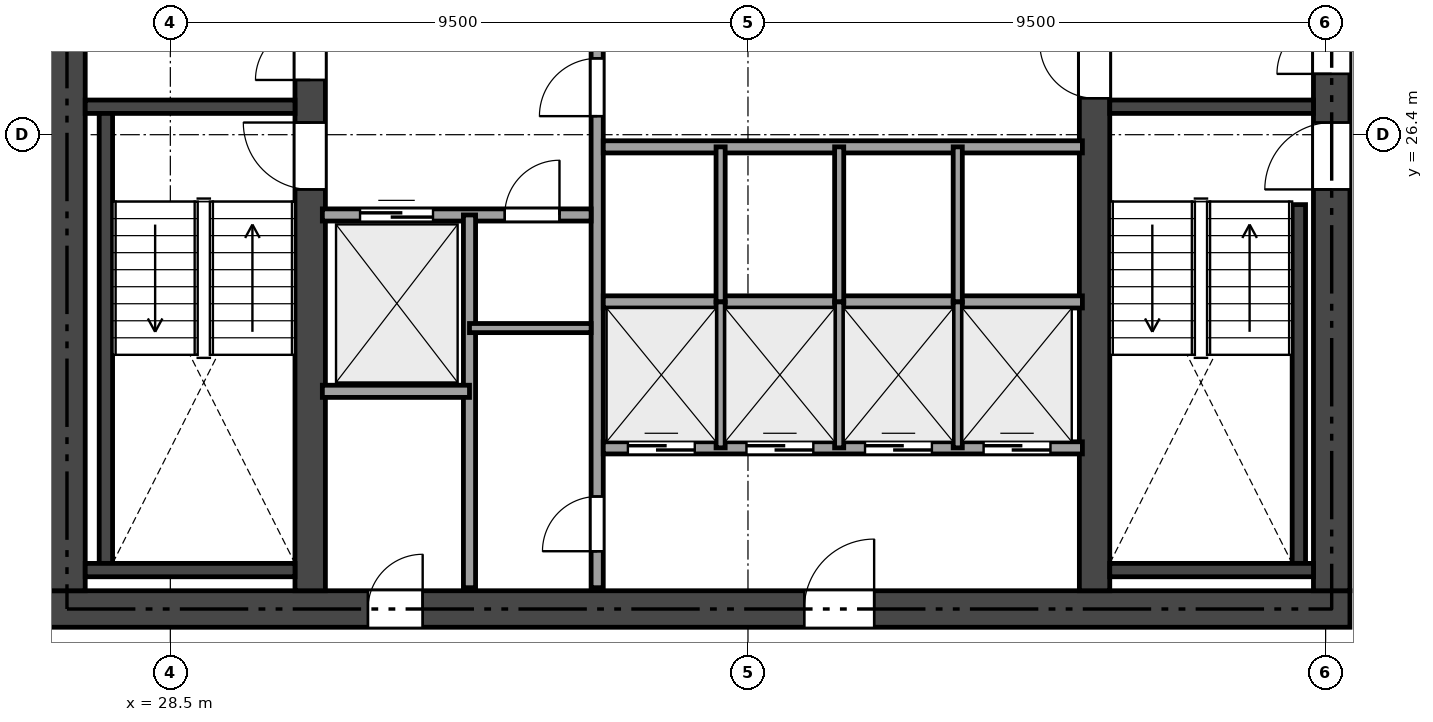
"""IFC4 building model, lengths in metres.
Left out: names, types, materials, properties, quantities, classifications, styles, units other than length and angle.
Written with IfcOpenShell. Run it as: python <this file> out.ifc"""

import sys

from ifc_helpers import new_model, si_unit, direction, frame, frame_2d, origin, place, context, subcontext, project, spatial, rectangle, extrude, element, fill, save


model = new_model("IFC4")
c1 = context("Model", 3, precision=1e-05, world=origin(), true_north=direction((0.0, 1.0)))
c2 = subcontext(c1, "Body", "Model", "MODEL_VIEW")
j1 = project(units=[si_unit("LENGTHUNIT", "METRE"), si_unit("PLANEANGLEUNIT", "RADIAN")], contexts=[c1])
p1 = place(None, origin())
s1 = spatial("IfcSite", under=j1, at=p1, CompositionType="ELEMENT")
p2 = place(p1, origin())
s2 = spatial("IfcBuilding", under=s1, at=p2, CompositionType="ELEMENT")
p3 = place(p2, frame((0.0, 0.0, 79.8)))
s3 = spatial("IfcBuildingStorey", under=s2, at=p3, CompositionType="ELEMENT", Elevation=79.8)
p4 = place(p3, frame((26.5, 18.6, 0.0), z_axis=(0.0, 0.0, 1.0), x_axis=(1.0, 0.0, 0.0)))
e1 = element("IfcWall", 1, at=p4, inside=s3, PredefinedType="SHEAR", context=c2, shape_type="SweptSolid", body=[
    extrude(rectangle(XDim=21.4, YDim=0.6, at=frame_2d((10.7, 0.0))), origin(), (0.0, 0.0, 1.0), 3.17),
])
p5 = place(p4, frame((12.425, 0.0, 0.0)))
e2 = element("IfcOpeningElement", 2, at=p5, cuts=e1, PredefinedType="OPENING", context=c2, shape_type="SweptSolid", body=[
    extrude(rectangle(XDim=1.15, YDim=2.15, at=frame_2d((0.575, 1.075))), frame((0.0, 0.31, 0.0), z_axis=(0.0, -1.0, 0.0), x_axis=(1.0, 0.0, 0.0)), (0.0, 0.0, 1.0), 0.62),
])
p6 = place(p4, frame((5.25, 0.0, 0.0)))
e3 = element("IfcOpeningElement", 3, at=p6, cuts=e1, PredefinedType="OPENING", context=c2, shape_type="SweptSolid", body=[
    extrude(rectangle(XDim=0.9, YDim=2.1, at=frame_2d((0.45, 1.05))), frame((0.0, 0.31, 0.0), z_axis=(0.0, -1.0, 0.0), x_axis=(1.0, 0.0, 0.0)), (0.0, 0.0, 1.0), 0.62),
])
p7 = place(p3, frame((26.8, 18.9, 0.0), z_axis=(0.0, 0.0, 1.0), x_axis=(0.0, 1.0, 0.0)))
e4 = element("IfcWall", 4, at=p7, inside=s3, PredefinedType="SHEAR", context=c2, shape_type="SweptSolid", body=[
    extrude(rectangle(XDim=15.0, YDim=0.6, at=frame_2d((7.5, 0.0))), origin(), (0.0, 0.0, 1.0), 3.17),
])
p8 = place(p3, frame((47.6, 18.9, 0.0), z_axis=(0.0, 0.0, 1.0), x_axis=(0.0, 1.0, 0.0)))
e5 = element("IfcWall", 5, at=p8, inside=s3, PredefinedType="SHEAR", context=c2, shape_type="SweptSolid", body=[
    extrude(rectangle(XDim=15.0, YDim=0.6, at=frame_2d((7.5, 0.0))), origin(), (0.0, 0.0, 1.0), 3.17),
])
p9 = place(p8, frame((6.6, 0.0, 0.0)))
e6 = element("IfcOpeningElement", 6, at=p9, cuts=e5, PredefinedType="OPENING", context=c2, shape_type="SweptSolid", body=[
    extrude(rectangle(XDim=1.1, YDim=2.15, at=frame_2d((0.55, 1.075))), frame((0.0, 0.31, 0.0), z_axis=(0.0, -1.0, 0.0), x_axis=(1.0, 0.0, 0.0)), (0.0, 0.0, 1.0), 0.62),
])
p10 = place(p8, frame((8.5, 0.0, 0.0)))
e7 = element("IfcOpeningElement", 7, at=p10, cuts=e5, PredefinedType="OPENING", context=c2, shape_type="SweptSolid", body=[
    extrude(rectangle(XDim=0.9, YDim=2.1, at=frame_2d((0.45, 1.05))), frame((0.0, 0.31, 0.0), z_axis=(0.0, -1.0, 0.0), x_axis=(1.0, 0.0, 0.0)), (0.0, 0.0, 1.0), 0.62),
])
p11 = place(p8, frame((13.15, 0.0, 0.0)))
e8 = element("IfcOpeningElement", 8, at=p11, cuts=e5, PredefinedType="OPENING", context=c2, shape_type="SweptSolid", body=[
    extrude(rectangle(XDim=0.9, YDim=2.1, at=frame_2d((0.45, 1.05))), frame((0.0, 0.31, 0.0), z_axis=(0.0, -1.0, 0.0), x_axis=(1.0, 0.0, 0.0)), (0.0, 0.0, 1.0), 0.62),
])
p12 = place(p3, frame((30.8, 18.9, 0.0), z_axis=(0.0, 0.0, 1.0), x_axis=(0.0, 1.0, 0.0)))
e9 = element("IfcWall", 9, at=p12, inside=s3, PredefinedType="SHEAR", context=c2, shape_type="SweptSolid", body=[
    extrude(rectangle(XDim=15.0, YDim=0.5, at=frame_2d((7.5, 0.0))), origin(), (0.0, 0.0, 1.0), 3.17),
])
p13 = place(p12, frame((6.6, 0.0, 0.0)))
e10 = element("IfcOpeningElement", 10, at=p13, cuts=e9, PredefinedType="OPENING", context=c2, shape_type="SweptSolid", body=[
    extrude(rectangle(XDim=1.1, YDim=2.15, at=frame_2d((0.55, 1.075))), frame((0.0, 0.26, 0.0), z_axis=(0.0, -1.0, 0.0), x_axis=(1.0, 0.0, 0.0)), (0.0, 0.0, 1.0), 0.52),
])
p14 = place(p12, frame((8.4, 0.0, 0.0)))
e11 = element("IfcOpeningElement", 11, at=p14, cuts=e9, PredefinedType="OPENING", context=c2, shape_type="SweptSolid", body=[
    extrude(rectangle(XDim=0.9, YDim=2.1, at=frame_2d((0.45, 1.05))), frame((0.0, 0.26, 0.0), z_axis=(0.0, -1.0, 0.0), x_axis=(1.0, 0.0, 0.0)), (0.0, 0.0, 1.0), 0.52),
])
p15 = place(p3, frame((43.7, 18.9, 0.0), z_axis=(0.0, 0.0, 1.0), x_axis=(0.0, 1.0, 0.0)))
e12 = element("IfcWall", 12, at=p15, inside=s3, PredefinedType="SHEAR", context=c2, shape_type="SweptSolid", body=[
    extrude(rectangle(XDim=15.0, YDim=0.5, at=frame_2d((7.5, 0.0))), origin(), (0.0, 0.0, 1.0), 3.17),
])
p16 = place(p15, frame((8.1, 0.0, 0.0)))
e13 = element("IfcOpeningElement", 13, at=p16, cuts=e12, PredefinedType="OPENING", context=c2, shape_type="SweptSolid", body=[
    extrude(rectangle(XDim=0.9, YDim=2.1, at=frame_2d((0.45, 1.05))), frame((0.0, 0.26, 0.0), z_axis=(0.0, -1.0, 0.0), x_axis=(1.0, 0.0, 0.0)), (0.0, 0.0, 1.0), 0.52),
])
p17 = place(p3, frame((27.1, 26.86, 0.0), z_axis=(0.0, 0.0, 1.0), x_axis=(1.0, 0.0, 0.0)))
e14 = element("IfcWall", 14, at=p17, inside=s3, PredefinedType="SHEAR", context=c2, shape_type="SweptSolid", body=[
    extrude(rectangle(XDim=3.45, YDim=0.22, at=frame_2d((1.725, 0.0))), origin(), (0.0, 0.0, 1.0), 3.17),
])
p18 = place(p3, frame((27.44, 19.35, 0.0), z_axis=(0.0, 0.0, 1.0), x_axis=(0.0, 1.0, 0.0)))
e15 = element("IfcWall", 15, at=p18, inside=s3, PredefinedType="SHEAR", context=c2, shape_type="SweptSolid", body=[
    extrude(rectangle(XDim=7.4, YDim=0.22, at=frame_2d((3.7, 0.0))), origin(), (0.0, 0.0, 1.0), 3.17),
])
p19 = place(p3, frame((27.1, 19.24, 0.0), z_axis=(0.0, 0.0, 1.0), x_axis=(1.0, 0.0, 0.0)))
e16 = element("IfcWall", 16, at=p19, inside=s3, PredefinedType="SHEAR", context=c2, shape_type="SweptSolid", body=[
    extrude(rectangle(XDim=3.45, YDim=0.22, at=frame_2d((1.725, 0.0))), origin(), (0.0, 0.0, 1.0), 3.17),
])
p20 = place(p3, frame((43.95, 26.86, 0.0), z_axis=(0.0, 0.0, 1.0), x_axis=(1.0, 0.0, 0.0)))
e17 = element("IfcWall", 17, at=p20, inside=s3, PredefinedType="SHEAR", context=c2, shape_type="SweptSolid", body=[
    extrude(rectangle(XDim=3.35, YDim=0.22, at=frame_2d((1.675, 0.0))), origin(), (0.0, 0.0, 1.0), 3.17),
])
p21 = place(p3, frame((47.06, 19.35, 0.0), z_axis=(0.0, 0.0, 1.0), x_axis=(0.0, 1.0, 0.0)))
e18 = element("IfcWall", 18, at=p21, inside=s3, PredefinedType="SHEAR", context=c2, shape_type="SweptSolid", body=[
    extrude(rectangle(XDim=5.9, YDim=0.22, at=frame_2d((2.95, 0.0))), origin(), (0.0, 0.0, 1.0), 3.17),
])
p22 = place(p3, frame((43.95, 19.24, 0.0), z_axis=(0.0, 0.0, 1.0), x_axis=(1.0, 0.0, 0.0)))
e19 = element("IfcWall", 19, at=p22, inside=s3, PredefinedType="SHEAR", context=c2, shape_type="SweptSolid", body=[
    extrude(rectangle(XDim=3.35, YDim=0.22, at=frame_2d((1.675, 0.0))), origin(), (0.0, 0.0, 1.0), 3.17),
])
p23 = place(p3, frame((35.52, 18.95, 0.0), z_axis=(0.0, 0.0, 1.0), x_axis=(0.0, 1.0, 0.0)))
e20 = element("IfcWall", 20, at=p23, inside=s3, PredefinedType="SOLIDWALL", context=c2, shape_type="SweptSolid", body=[
    extrude(rectangle(XDim=14.9, YDim=0.2, at=frame_2d((7.45, 0.0))), origin(), (0.0, 0.0, 1.0), 2.691),
])
p24 = place(p23, frame((7.755, 0.0, 0.0)))
e21 = element("IfcOpeningElement", 21, at=p24, cuts=e20, PredefinedType="OPENING", context=c2, shape_type="SweptSolid", body=[
    extrude(rectangle(XDim=0.95, YDim=2.15, at=frame_2d((0.475, 1.075))), frame((0.0, 0.11, 0.0), z_axis=(0.0, -1.0, 0.0), x_axis=(1.0, 0.0, 0.0)), (0.0, 0.0, 1.0), 0.22),
])
p25 = place(p23, frame((0.6, 0.0, 0.0)))
e22 = element("IfcOpeningElement", 22, at=p25, cuts=e20, PredefinedType="OPENING", context=c2, shape_type="SweptSolid", body=[
    extrude(rectangle(XDim=0.9, YDim=2.1, at=frame_2d((0.45, 1.05))), frame((0.0, 0.11, 0.0), z_axis=(0.0, -1.0, 0.0), x_axis=(1.0, 0.0, 0.0)), (0.0, 0.0, 1.0), 0.22),
])
p26 = place(p3, frame((31.0, 25.08, 0.0), z_axis=(0.0, 0.0, 1.0), x_axis=(1.0, 0.0, 0.0)))
e23 = element("IfcWall", 23, at=p26, inside=s3, PredefinedType="SOLIDWALL", context=c2, shape_type="SweptSolid", body=[
    extrude(rectangle(XDim=4.42, YDim=0.2, at=frame_2d((2.21, 0.0))), origin(), (0.0, 0.0, 1.0), 3.17),
])
p27 = place(p26, frame((3.0, 0.0, 0.0)))
e24 = element("IfcOpeningElement", 24, at=p27, cuts=e23, PredefinedType="OPENING", context=c2, shape_type="SweptSolid", body=[
    extrude(rectangle(XDim=0.9, YDim=2.1, at=frame_2d((0.45, 1.05))), frame((0.0, 0.11, 0.0), z_axis=(0.0, -1.0, 0.0), x_axis=(1.0, 0.0, 0.0)), (0.0, 0.0, 1.0), 0.22),
])
p28 = place(p26, frame((0.62, 0.0, 0.0)))
e25 = element("IfcOpeningElement", 25, at=p28, cuts=e23, PredefinedType="OPENING", context=c2, shape_type="SweptSolid", body=[
    extrude(rectangle(XDim=1.2, YDim=2.15, at=frame_2d((0.6, 1.075))), frame((0.0, 0.11, 0.0), z_axis=(0.0, -1.0, 0.0), x_axis=(1.0, 0.0, 0.0)), (0.0, 0.0, 1.0), 0.22),
])
p29 = place(p3, frame((33.42, 18.95, 0.0), z_axis=(0.0, 0.0, 1.0), x_axis=(0.0, 1.0, 0.0)))
e26 = element("IfcWall", 26, at=p29, inside=s3, PredefinedType="SOLIDWALL", context=c2, shape_type="SweptSolid", body=[
    extrude(rectangle(XDim=6.13, YDim=0.2, at=frame_2d((3.065, 0.0))), origin(), (0.0, 0.0, 1.0), 2.691),
])
p30 = place(p3, frame((31.0, 22.18, 0.0), z_axis=(0.0, 0.0, 1.0), x_axis=(1.0, 0.0, 0.0)))
e27 = element("IfcWall", 27, at=p30, inside=s3, PredefinedType="SOLIDWALL", context=c2, shape_type="SweptSolid", body=[
    extrude(rectangle(XDim=2.42, YDim=0.2, at=frame_2d((1.21, 0.0))), origin(), (0.0, 0.0, 1.0), 3.17),
])
p31 = place(p3, frame((33.42, 23.22, 0.0), z_axis=(0.0, 0.0, 1.0), x_axis=(1.0, 0.0, 0.0)))
e28 = element("IfcWall", 28, at=p31, inside=s3, PredefinedType="PARTITIONING", context=c2, shape_type="SweptSolid", body=[
    extrude(rectangle(XDim=2.0, YDim=0.15, at=frame_2d((1.0, 0.0))), origin(), (0.0, 0.0, 1.0), 3.17),
])
p32 = place(p3, frame((35.62, 26.2, 0.0), z_axis=(0.0, 0.0, 1.0), x_axis=(1.0, 0.0, 0.0)))
e29 = element("IfcWall", 29, at=p32, inside=s3, PredefinedType="SOLIDWALL", context=c2, shape_type="SweptSolid", body=[
    extrude(rectangle(XDim=7.88, YDim=0.2, at=frame_2d((3.94, 0.0))), origin(), (0.0, 0.0, 1.0), 3.17),
])
p33 = place(p3, frame((35.62, 23.65, 0.0), z_axis=(0.0, 0.0, 1.0), x_axis=(1.0, 0.0, 0.0)))
e30 = element("IfcWall", 30, at=p33, inside=s3, PredefinedType="SOLIDWALL", context=c2, shape_type="SweptSolid", body=[
    extrude(rectangle(XDim=7.88, YDim=0.2, at=frame_2d((3.94, 0.0))), origin(), (0.0, 0.0, 1.0), 2.691),
])
p34 = place(p3, frame((35.62, 21.25, 0.0), z_axis=(0.0, 0.0, 1.0), x_axis=(1.0, 0.0, 0.0)))
e31 = element("IfcWall", 31, at=p34, inside=s3, PredefinedType="SOLIDWALL", context=c2, shape_type="SweptSolid", body=[
    extrude(rectangle(XDim=7.88, YDim=0.2, at=frame_2d((3.94, 0.0))), origin(), (0.0, 0.0, 1.0), 3.17),
])
p35 = place(p34, frame((0.405, 0.0, 0.0)))
e32 = element("IfcOpeningElement", 32, at=p35, cuts=e31, PredefinedType="OPENING", context=c2, shape_type="SweptSolid", body=[
    extrude(rectangle(XDim=1.1, YDim=2.15, at=frame_2d((0.55, 1.075))), frame((0.0, 0.11, 0.0), z_axis=(0.0, -1.0, 0.0), x_axis=(1.0, 0.0, 0.0)), (0.0, 0.0, 1.0), 0.22),
])
p36 = place(p34, frame((2.355, 0.0, 0.0)))
e33 = element("IfcOpeningElement", 33, at=p36, cuts=e31, PredefinedType="OPENING", context=c2, shape_type="SweptSolid", body=[
    extrude(rectangle(XDim=1.1, YDim=2.15, at=frame_2d((0.55, 1.075))), frame((0.0, 0.11, 0.0), z_axis=(0.0, -1.0, 0.0), x_axis=(1.0, 0.0, 0.0)), (0.0, 0.0, 1.0), 0.22),
])
p37 = place(p34, frame((4.305, 0.0, 0.0)))
e34 = element("IfcOpeningElement", 34, at=p37, cuts=e31, PredefinedType="OPENING", context=c2, shape_type="SweptSolid", body=[
    extrude(rectangle(XDim=1.1, YDim=2.15, at=frame_2d((0.55, 1.075))), frame((0.0, 0.11, 0.0), z_axis=(0.0, -1.0, 0.0), x_axis=(1.0, 0.0, 0.0)), (0.0, 0.0, 1.0), 0.22),
])
p38 = place(p34, frame((6.255, 0.0, 0.0)))
e35 = element("IfcOpeningElement", 35, at=p38, cuts=e31, PredefinedType="OPENING", context=c2, shape_type="SweptSolid", body=[
    extrude(rectangle(XDim=1.1, YDim=2.15, at=frame_2d((0.55, 1.075))), frame((0.0, 0.11, 0.0), z_axis=(0.0, -1.0, 0.0), x_axis=(1.0, 0.0, 0.0)), (0.0, 0.0, 1.0), 0.22),
])
for number, where, z_axis, x_axis in (
    (36, (37.55, 23.65, 0.0), (0.0, 0.0, 1.0), (0.0, 1.0, 0.0)),
    (37, (39.5, 23.65, 0.0), (0.0, 0.0, 1.0), (0.0, 1.0, 0.0)),
    (38, (41.45, 23.65, 0.0), (0.0, 0.0, 1.0), (0.0, 1.0, 0.0)),
):
    element("IfcWall", number, at=place(p3, frame(where, z_axis=z_axis, x_axis=x_axis)), inside=s3, PredefinedType="PARTITIONING", context=c2, shape_type="SweptSolid", body=[
        extrude(rectangle(XDim=2.55, YDim=0.15, at=frame_2d((1.275, 0.0))), origin(), (0.0, 0.0, 1.0), 2.691),
    ])
for number, where, z_axis, x_axis in (
    (39, (37.55, 21.25, 0.0), (0.0, 0.0, 1.0), (0.0, 1.0, 0.0)),
    (40, (39.5, 21.25, 0.0), (0.0, 0.0, 1.0), (0.0, 1.0, 0.0)),
    (41, (41.45, 21.25, 0.0), (0.0, 0.0, 1.0), (0.0, 1.0, 0.0)),
):
    element("IfcWall", number, at=place(p3, frame(where, z_axis=z_axis, x_axis=x_axis)), inside=s3, PredefinedType="PARTITIONING", context=c2, shape_type="SweptSolid", body=[
        extrude(rectangle(XDim=2.4, YDim=0.15, at=frame_2d((1.2, 0.0))), origin(), (0.0, 0.0, 1.0), 2.691),
    ])
p39 = place(p13, origin())
e42 = element("IfcDoor", 42, at=p39, inside=s3, OperationType="SINGLE_SWING_RIGHT", PredefinedType="DOOR", context=c2, shape_type="SweptSolid", body=[
    extrude(rectangle(XDim=1.1, YDim=2.15, at=frame_2d((0.55, 1.075))), frame((0.0, 0.025, 0.0), z_axis=(0.0, -1.0, 0.0), x_axis=(1.0, 0.0, 0.0)), (0.0, 0.0, 1.0), 0.05),
])
fill(e10, e42)
p40 = place(p9, origin())
e43 = element("IfcDoor", 43, at=p40, inside=s3, OperationType="SINGLE_SWING_LEFT", PredefinedType="DOOR", context=c2, shape_type="SweptSolid", body=[
    extrude(rectangle(XDim=1.1, YDim=2.15, at=frame_2d((0.55, 1.075))), frame((0.0, 0.025, 0.0), z_axis=(0.0, -1.0, 0.0), x_axis=(1.0, 0.0, 0.0)), (0.0, 0.0, 1.0), 0.05),
])
fill(e6, e43)
p41 = place(p24, origin())
e44 = element("IfcDoor", 44, at=p41, inside=s3, OperationType="SINGLE_SWING_LEFT", PredefinedType="DOOR", context=c2, shape_type="SweptSolid", body=[
    extrude(rectangle(XDim=0.95, YDim=2.15, at=frame_2d((0.475, 1.075))), frame((0.0, 0.025, 0.0), z_axis=(0.0, -1.0, 0.0), x_axis=(1.0, 0.0, 0.0)), (0.0, 0.0, 1.0), 0.05),
])
fill(e21, e44)
p42 = place(p16, origin())
e45 = element("IfcDoor", 45, at=p42, inside=s3, OperationType="SINGLE_SWING_RIGHT", PredefinedType="DOOR", context=c2, shape_type="SweptSolid", body=[
    extrude(rectangle(XDim=0.9, YDim=2.1, at=frame_2d((0.45, 1.05))), frame((0.0, 0.025, 0.0), z_axis=(0.0, -1.0, 0.0), x_axis=(1.0, 0.0, 0.0)), (0.0, 0.0, 1.0), 0.05),
])
fill(e13, e45)
p43 = place(p10, origin())
e46 = element("IfcDoor", 46, at=p43, inside=s3, OperationType="SINGLE_SWING_LEFT", PredefinedType="DOOR", context=c2, shape_type="SweptSolid", body=[
    extrude(rectangle(XDim=0.9, YDim=2.1, at=frame_2d((0.45, 1.05))), frame((0.0, 0.025, 0.0), z_axis=(0.0, -1.0, 0.0), x_axis=(1.0, 0.0, 0.0)), (0.0, 0.0, 1.0), 0.05),
])
fill(e7, e46)
p44 = place(p5, origin())
e47 = element("IfcDoor", 47, at=p44, inside=s3, OperationType="SINGLE_SWING_RIGHT", PredefinedType="DOOR", context=c2, shape_type="SweptSolid", body=[
    extrude(rectangle(XDim=1.15, YDim=2.15, at=frame_2d((0.575, 1.075))), frame((0.0, 0.025, 0.0), z_axis=(0.0, -1.0, 0.0), x_axis=(1.0, 0.0, 0.0)), (0.0, 0.0, 1.0), 0.05),
])
fill(e2, e47)
p45 = place(p14, origin())
e48 = element("IfcDoor", 48, at=p45, inside=s3, OperationType="SINGLE_SWING_LEFT", PredefinedType="DOOR", context=c2, shape_type="SweptSolid", body=[
    extrude(rectangle(XDim=0.9, YDim=2.1, at=frame_2d((0.45, 1.05))), frame((0.0, 0.025, 0.0), z_axis=(0.0, -1.0, 0.0), x_axis=(1.0, 0.0, 0.0)), (0.0, 0.0, 1.0), 0.05),
])
fill(e11, e48)
p46 = place(p6, origin())
e49 = element("IfcDoor", 49, at=p46, inside=s3, OperationType="SINGLE_SWING_RIGHT", PredefinedType="DOOR", context=c2, shape_type="SweptSolid", body=[
    extrude(rectangle(XDim=0.9, YDim=2.1, at=frame_2d((0.45, 1.05))), frame((0.0, 0.025, 0.0), z_axis=(0.0, -1.0, 0.0), x_axis=(1.0, 0.0, 0.0)), (0.0, 0.0, 1.0), 0.05),
])
fill(e3, e49)
p47 = place(p25, origin())
e50 = element("IfcDoor", 50, at=p47, inside=s3, OperationType="SINGLE_SWING_LEFT", PredefinedType="DOOR", context=c2, shape_type="SweptSolid", body=[
    extrude(rectangle(XDim=0.9, YDim=2.1, at=frame_2d((0.45, 1.05))), frame((0.0, 0.025, 0.0), z_axis=(0.0, -1.0, 0.0), x_axis=(1.0, 0.0, 0.0)), (0.0, 0.0, 1.0), 0.05),
])
fill(e22, e50)
p48 = place(p27, origin())
e51 = element("IfcDoor", 51, at=p48, inside=s3, OperationType="SINGLE_SWING_RIGHT", PredefinedType="DOOR", context=c2, shape_type="SweptSolid", body=[
    extrude(rectangle(XDim=0.9, YDim=2.1, at=frame_2d((0.45, 1.05))), frame((0.0, 0.025, 0.0), z_axis=(0.0, -1.0, 0.0), x_axis=(1.0, 0.0, 0.0)), (0.0, 0.0, 1.0), 0.05),
])
fill(e24, e51)
p49 = place(p28, origin())
e52 = element("IfcDoor", 52, at=p49, inside=s3, OperationType="SLIDING_TO_LEFT", PredefinedType="DOOR", context=c2, shape_type="SweptSolid", body=[
    extrude(rectangle(XDim=1.2, YDim=2.15, at=frame_2d((0.6, 1.075))), frame((0.0, 0.025, 0.0), z_axis=(0.0, -1.0, 0.0), x_axis=(1.0, 0.0, 0.0)), (0.0, 0.0, 1.0), 0.05),
])
fill(e25, e52)
p50 = place(p35, origin())
e53 = element("IfcDoor", 53, at=p50, inside=s3, OperationType="SLIDING_TO_LEFT", PredefinedType="DOOR", context=c2, shape_type="SweptSolid", body=[
    extrude(rectangle(XDim=1.1, YDim=2.15, at=frame_2d((0.55, 1.075))), frame((0.0, 0.025, 0.0), z_axis=(0.0, -1.0, 0.0), x_axis=(1.0, 0.0, 0.0)), (0.0, 0.0, 1.0), 0.05),
])
fill(e32, e53)
p51 = place(p36, origin())
e54 = element("IfcDoor", 54, at=p51, inside=s3, OperationType="SLIDING_TO_LEFT", PredefinedType="DOOR", context=c2, shape_type="SweptSolid", body=[
    extrude(rectangle(XDim=1.1, YDim=2.15, at=frame_2d((0.55, 1.075))), frame((0.0, 0.025, 0.0), z_axis=(0.0, -1.0, 0.0), x_axis=(1.0, 0.0, 0.0)), (0.0, 0.0, 1.0), 0.05),
])
fill(e33, e54)
p52 = place(p37, origin())
e55 = element("IfcDoor", 55, at=p52, inside=s3, OperationType="SLIDING_TO_LEFT", PredefinedType="DOOR", context=c2, shape_type="SweptSolid", body=[
    extrude(rectangle(XDim=1.1, YDim=2.15, at=frame_2d((0.55, 1.075))), frame((0.0, 0.025, 0.0), z_axis=(0.0, -1.0, 0.0), x_axis=(1.0, 0.0, 0.0)), (0.0, 0.0, 1.0), 0.05),
])
fill(e34, e55)
p53 = place(p38, origin())
e56 = element("IfcDoor", 56, at=p53, inside=s3, OperationType="SLIDING_TO_LEFT", PredefinedType="DOOR", context=c2, shape_type="SweptSolid", body=[
    extrude(rectangle(XDim=1.1, YDim=2.15, at=frame_2d((0.55, 1.075))), frame((0.0, 0.025, 0.0), z_axis=(0.0, -1.0, 0.0), x_axis=(1.0, 0.0, 0.0)), (0.0, 0.0, 1.0), 0.05),
])
fill(e35, e56)
save(model, sys.argv[1])
